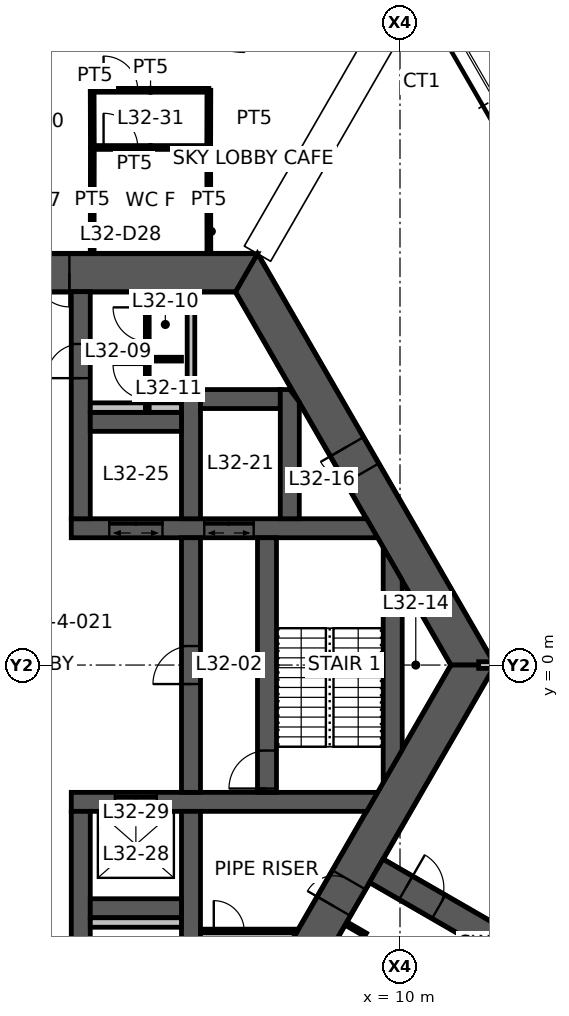
"""IFC4 building model, lengths in metres.
Left out: names, types, materials, properties, quantities, classifications, styles, units other than length and angle.
Written with IfcOpenShell. Run it as: python <this file> out.ifc"""

import sys

from ifc_helpers import new_model, si_unit, direction, frame, frame_2d, origin, place, context, subcontext, project, spatial, polyline, rectangle, outline, extrude, element, fill, save


model = new_model("IFC4")
c1 = context("Model", 3, precision=1e-05, world=origin(), true_north=direction((0.0, 1.0)))
c2 = subcontext(c1, "Body", "Model", "MODEL_VIEW")
j1 = project(units=[si_unit("LENGTHUNIT", "METRE"), si_unit("PLANEANGLEUNIT", "RADIAN")], contexts=[c1])
p1 = place(None, origin())
s1 = spatial("IfcSite", under=j1, at=p1, CompositionType="ELEMENT")
p2 = place(p1, origin())
s2 = spatial("IfcBuilding", under=s1, at=p2, CompositionType="ELEMENT")
p3 = place(p2, frame((0.0, 0.0, 128.6)))
s3 = spatial("IfcBuildingStorey", under=s2, at=p3, CompositionType="ELEMENT", Elevation=128.6)
p4 = place(p3, frame((11.922, 0.0, 0.0), z_axis=(0.0, 0.0, 1.0), x_axis=(-0.500004296715, 0.866022923061, 0.0)))
e1 = element("IfcWall", 1, at=p4, inside=s3, PredefinedType="SHEAR", context=c2, shape_type="SweptSolid", body=[
    extrude(outline(polyline([(-0.289, -0.5), (5.835, -0.5), (6.635, -0.5), (12.211, -0.5), (11.634, 0.5), (6.635, 0.5), (5.835, 0.5), (0.289, 0.5), (-0.289, -0.5)])), origin(), (0.0, 0.0, 1.0), 4.5),
])
p5 = place(p4, frame((5.835, 0.0, 0.0)))
e2 = element("IfcOpeningElement", 2, at=p5, cuts=e1, PredefinedType="OPENING", context=c2, shape_type="SweptSolid", body=[
    extrude(rectangle(XDim=0.8, YDim=2.1, at=frame_2d((0.4, 1.05))), frame((0.0, 0.51, 0.0), z_axis=(0.0, -1.0, 0.0), x_axis=(1.0, 0.0, 0.0)), (0.0, 0.0, 1.0), 1.02),
])
p6 = place(p3, frame((5.961, 10.325, 0.0), z_axis=(0.0, 0.0, 1.0), x_axis=(-1.0, 0.0, 0.0)))
e3 = element("IfcWall", 3, at=p6, inside=s3, PredefinedType="SHEAR", context=c2, shape_type="SweptSolid", body=[
    extrude(outline(polyline([(-0.289, -0.5), (4.661, -0.5), (5.561, -0.5), (6.361, -0.5), (7.261, -0.5), (12.211, -0.5), (11.634, 0.5), (7.261, 0.5), (6.361, 0.5), (5.561, 0.5), (4.661, 0.5), (0.289, 0.5), (-0.289, -0.5)])), origin(), (0.0, 0.0, 1.0), 4.5),
])
p7 = place(p6, frame((6.361, 0.0, 0.0)))
e4 = element("IfcOpeningElement", 4, at=p7, cuts=e3, PredefinedType="OPENING", context=c2, shape_type="SweptSolid", body=[
    extrude(rectangle(XDim=0.9, YDim=2.1, at=frame_2d((0.45, 1.05))), frame((0.0, 0.51, 0.0), z_axis=(0.0, -1.0, 0.0), x_axis=(1.0, 0.0, 0.0)), (0.0, 0.0, 1.0), 1.02),
])
p8 = place(p6, frame((4.661, 0.0, 0.0)))
e5 = element("IfcOpeningElement", 5, at=p8, cuts=e3, PredefinedType="OPENING", context=c2, shape_type="SweptSolid", body=[
    extrude(rectangle(XDim=0.9, YDim=2.1, at=frame_2d((0.45, 1.05))), frame((0.0, 0.51, 0.0), z_axis=(0.0, -1.0, 0.0), x_axis=(1.0, 0.0, 0.0)), (0.0, 0.0, 1.0), 1.02),
])
p9 = place(p3, frame((5.961, -10.325, 0.0), z_axis=(0.0, 0.0, 1.0), x_axis=(0.500004296715, 0.866022923061, 0.0)))
e6 = element("IfcWall", 6, at=p9, inside=s3, PredefinedType="SHEAR", context=c2, shape_type="SweptSolid", body=[
    extrude(outline(polyline([(-0.289, -0.5), (4.594, -0.5), (5.394, -0.5), (12.211, -0.5), (11.634, 0.5), (5.394, 0.5), (4.594, 0.5), (0.289, 0.5), (-0.289, -0.5)])), origin(), (0.0, 0.0, 1.0), 4.5),
])
p10 = place(p9, frame((4.594, 0.0, 0.0)))
e7 = element("IfcOpeningElement", 7, at=p10, cuts=e6, PredefinedType="OPENING", context=c2, shape_type="SweptSolid", body=[
    extrude(rectangle(XDim=0.8, YDim=2.1, at=frame_2d((0.4, 1.05))), frame((0.0, 0.51, 0.0), z_axis=(0.0, -1.0, 0.0), x_axis=(1.0, 0.0, 0.0)), (0.0, 0.0, 1.0), 1.02),
])
p11 = place(p3, frame((9.375, -5.413, 0.0), z_axis=(0.0, 0.0, 1.0), x_axis=(0.866032377459, -0.499987921047, 0.0)))
e8 = element("IfcWall", 8, at=p11, inside=s3, PredefinedType="SHEAR", context=c2, shape_type="SweptSolid", body=[
    extrude(rectangle(XDim=7.696, YDim=0.7, at=frame_2d((3.848, 0.0))), origin(), (0.0, 0.0, 1.0), 4.5),
])
p12 = place(p11, frame((0.9, 0.0, 0.0)))
e9 = element("IfcOpeningElement", 9, at=p12, cuts=e8, PredefinedType="OPENING", context=c2, shape_type="SweptSolid", body=[
    extrude(rectangle(XDim=1.0, YDim=2.1, at=frame_2d((0.5, 1.05))), frame((0.0, 0.36, 0.0), z_axis=(0.0, -1.0, 0.0), x_axis=(1.0, 0.0, 0.0)), (0.0, 0.0, 1.0), 0.72),
])
p13 = place(p3, frame((1.35, 3.6, 0.0), z_axis=(0.0, 0.0, 1.0), x_axis=(1.0, 0.0, 0.0)))
e10 = element("IfcWall", 10, at=p13, inside=s3, PredefinedType="SHEAR", context=c2, shape_type="SweptSolid", body=[
    extrude(outline(polyline([(0.0, -0.25), (1.0, -0.25), (2.4, -0.25), (3.5, -0.25), (4.8, -0.25), (8.061, -0.25), (7.772, 0.25), (4.8, 0.25), (3.5, 0.25), (2.4, 0.25), (1.0, 0.25), (0.0, 0.25), (0.0, -0.25)])), origin(), (0.0, 0.0, 1.0), 4.5),
])
p14 = place(p13, frame((1.0, 0.0, 0.0)))
e11 = element("IfcOpeningElement", 11, at=p14, cuts=e10, PredefinedType="OPENING", context=c2, shape_type="SweptSolid", body=[
    extrude(rectangle(XDim=1.4, YDim=2.1, at=frame_2d((0.7, 1.05))), frame((0.0, 0.26, 0.0), z_axis=(0.0, -1.0, 0.0), x_axis=(1.0, 0.0, 0.0)), (0.0, 0.0, 1.0), 0.52),
])
p15 = place(p13, frame((3.5, 0.0, 0.0)))
e12 = element("IfcOpeningElement", 12, at=p15, cuts=e10, PredefinedType="OPENING", context=c2, shape_type="SweptSolid", body=[
    extrude(rectangle(XDim=1.3, YDim=2.1, at=frame_2d((0.65, 1.05))), frame((0.0, 0.26, 0.0), z_axis=(0.0, -1.0, 0.0), x_axis=(1.0, 0.0, 0.0)), (0.0, 0.0, 1.0), 0.52),
])
p16 = place(p3, frame((1.35, -3.6, 0.0), z_axis=(0.0, 0.0, 1.0), x_axis=(1.0, 0.0, 0.0)))
e13 = element("IfcWall", 13, at=p16, inside=s3, PredefinedType="SHEAR", context=c2, shape_type="SweptSolid", body=[
    extrude(outline(polyline([(0.0, -0.25), (1.15, -0.25), (2.25, -0.25), (7.772, -0.25), (8.061, 0.25), (2.25, 0.25), (1.15, 0.25), (0.0, 0.25), (0.0, -0.25)])), origin(), (0.0, 0.0, 1.0), 4.5),
])
p17 = place(p16, frame((1.15, 0.0, 0.0)))
e14 = element("IfcOpeningElement", 14, at=p17, cuts=e13, PredefinedType="OPENING", context=c2, shape_type="SweptSolid", body=[
    extrude(rectangle(XDim=1.1, YDim=2.1, at=frame_2d((0.55, 1.05))), frame((0.0, 0.26, 0.0), z_axis=(0.0, -1.0, 0.0), x_axis=(1.0, 0.0, 0.0)), (0.0, 0.0, 1.0), 0.52),
])
p18 = place(p3, frame((1.6, 3.85, 0.0), z_axis=(0.0, 0.0, 1.0), x_axis=(0.0, 1.0, 0.0)))
e15 = element("IfcWall", 15, at=p18, inside=s3, PredefinedType="SHEAR", context=c2, shape_type="SweptSolid", body=[
    extrude(rectangle(XDim=5.975, YDim=0.5, at=frame_2d((2.987, 0.0))), origin(), (0.0, 0.0, 1.0), 4.5),
])
p19 = place(p18, frame((3.7, 0.0, 0.0)))
e16 = element("IfcOpeningElement", 16, at=p19, cuts=e15, PredefinedType="OPENING", context=c2, shape_type="SweptSolid", body=[
    extrude(rectangle(XDim=0.9, YDim=2.1, at=frame_2d((0.45, 1.05))), frame((0.0, 0.26, 0.0), z_axis=(0.0, -1.0, 0.0), x_axis=(1.0, 0.0, 0.0)), (0.0, 0.0, 1.0), 0.52),
])
p20 = place(p3, frame((1.6, -3.85, 0.0), z_axis=(0.0, 0.0, 1.0), x_axis=(0.0, -1.0, 0.0)))
e17 = element("IfcWall", 17, at=p20, inside=s3, PredefinedType="SHEAR", context=c2, shape_type="SweptSolid", body=[
    extrude(rectangle(XDim=5.975, YDim=0.5, at=frame_2d((2.987, 0.0))), origin(), (0.0, 0.0, 1.0), 4.5),
])
p21 = place(p20, frame((3.55, 0.0, 0.0)))
e18 = element("IfcOpeningElement", 18, at=p21, cuts=e17, PredefinedType="OPENING", context=c2, shape_type="SweptSolid", body=[
    extrude(rectangle(XDim=1.2, YDim=2.1, at=frame_2d((0.6, 1.05))), frame((0.0, 0.26, 0.0), z_axis=(0.0, -1.0, 0.0), x_axis=(1.0, 0.0, 0.0)), (0.0, 0.0, 1.0), 0.52),
])
p22 = place(p3, frame((4.5, -3.35, 0.0), z_axis=(0.0, 0.0, 1.0), x_axis=(0.0, 1.0, 0.0)))
e19 = element("IfcWall", 19, at=p22, inside=s3, PredefinedType="SHEAR", context=c2, shape_type="SweptSolid", body=[
    extrude(rectangle(XDim=6.7, YDim=0.5, at=frame_2d((3.35, 0.0))), origin(), (0.0, 0.0, 1.0), 4.5),
])
p23 = place(p22, frame((2.85, 0.0, 0.0)))
e20 = element("IfcOpeningElement", 20, at=p23, cuts=e19, PredefinedType="OPENING", context=c2, shape_type="SweptSolid", body=[
    extrude(rectangle(XDim=1.0, YDim=2.1, at=frame_2d((0.5, 1.05))), frame((0.0, 0.26, 0.0), z_axis=(0.0, -1.0, 0.0), x_axis=(1.0, 0.0, 0.0)), (0.0, 0.0, 1.0), 0.52),
])
p24 = place(p3, frame((6.5, -3.35, 0.0), z_axis=(0.0, 0.0, 1.0), x_axis=(0.0, 1.0, 0.0)))
e21 = element("IfcWall", 21, at=p24, inside=s3, PredefinedType="SHEAR", context=c2, shape_type="SweptSolid", body=[
    extrude(rectangle(XDim=6.7, YDim=0.5, at=frame_2d((3.35, 0.0))), origin(), (0.0, 0.0, 1.0), 4.5),
])
p25 = place(p24, frame((0.1, 0.0, 0.0)))
e22 = element("IfcOpeningElement", 22, at=p25, cuts=e21, PredefinedType="OPENING", context=c2, shape_type="SweptSolid", body=[
    extrude(rectangle(XDim=1.0, YDim=2.1, at=frame_2d((0.5, 1.05))), frame((0.0, 0.26, 0.0), z_axis=(0.0, -1.0, 0.0), x_axis=(1.0, 0.0, 0.0)), (0.0, 0.0, 1.0), 0.52),
])
p26 = place(p3, frame((4.5, 3.85, 0.0), z_axis=(0.0, 0.0, 1.0), x_axis=(0.0, 1.0, 0.0)))
e23 = element("IfcWall", 23, at=p26, inside=s3, PredefinedType="SHEAR", context=c2, shape_type="SweptSolid", body=[
    extrude(rectangle(XDim=3.4, YDim=0.5, at=frame_2d((1.7, 0.0))), origin(), (0.0, 0.0, 1.0), 4.5),
])
p27 = place(p3, frame((4.5, -3.85, 0.0), z_axis=(0.0, 0.0, 1.0), x_axis=(0.0, -1.0, 0.0)))
e24 = element("IfcWall", 24, at=p27, inside=s3, PredefinedType="SHEAR", context=c2, shape_type="SweptSolid", body=[
    extrude(rectangle(XDim=5.975, YDim=0.5, at=frame_2d((2.987, 0.0))), origin(), (0.0, 0.0, 1.0), 4.5),
])
for number, where, z_axis, x_axis in (
    (25, (1.85, 6.4, 0.0), (0.0, 0.0, 1.0), (1.0, 0.0, 0.0)),
    (26, (1.85, -6.4, 0.0), (0.0, 0.0, 1.0), (1.0, 0.0, 0.0)),
):
    element("IfcWall", number, at=place(p3, frame(where, z_axis=z_axis, x_axis=x_axis)), inside=s3, PredefinedType="SHEAR", context=c2, shape_type="SweptSolid", body=[
        extrude(rectangle(XDim=2.4, YDim=0.5, at=frame_2d((1.2, 0.0))), origin(), (0.0, 0.0, 1.0), 4.5),
    ])
p28 = place(p3, frame((4.75, 7.0, 0.0), z_axis=(0.0, 0.0, 1.0), x_axis=(1.0, 0.0, 0.0)))
e27 = element("IfcWall", 27, at=p28, inside=s3, PredefinedType="SHEAR", context=c2, shape_type="SweptSolid", body=[
    extrude(rectangle(XDim=2.1, YDim=0.5, at=frame_2d((1.05, 0.0))), origin(), (0.0, 0.0, 1.0), 4.5),
])
p29 = place(p3, frame((7.1, 3.85, 0.0), z_axis=(0.0, 0.0, 1.0), x_axis=(0.0, 1.0, 0.0)))
e28 = element("IfcWall", 28, at=p29, inside=s3, PredefinedType="SHEAR", context=c2, shape_type="SweptSolid", body=[
    extrude(outline(polyline([(0.0, -0.25), (3.069, -0.25), (3.4, 0.0), (3.4, 0.25), (0.0, 0.25), (0.0, -0.25)])), origin(), (0.0, 0.0, 1.0), 4.5),
])
p30 = place(p3, frame((9.808, -2.662, 0.0), z_axis=(0.0, 0.0, 1.0), x_axis=(0.0, 1.0, 0.0)))
e29 = element("IfcWall", 29, at=p30, inside=s3, PredefinedType="SHEAR", context=c2, shape_type="SweptSolid", body=[
    extrude(outline(polyline([(0.433, -0.25), (4.892, -0.25), (5.758, 0.25), (-0.433, 0.25), (0.433, -0.25)])), origin(), (0.0, 0.0, 1.0), 4.5),
])
p31 = place(p3, frame((4.5, 7.25, 0.0), z_axis=(0.0, 0.0, 1.0), x_axis=(0.0, 1.0, 0.0)))
e30 = element("IfcWall", 30, at=p31, inside=s3, PredefinedType="STANDARD", context=c2, shape_type="SweptSolid", body=[
    extrude(rectangle(XDim=2.575, YDim=0.2, at=frame_2d((1.288, 0.0))), origin(), (0.0, 0.0, 1.0), 4.5),
])
for number, where, z_axis, x_axis in (
    (31, (1.85, 6.775, 0.0), (0.0, 0.0, 1.0), (1.0, 0.0, 0.0)),
    (32, (1.85, -6.775, 0.0), (0.0, 0.0, 1.0), (1.0, 0.0, 0.0)),
):
    element("IfcWall", number, at=place(p3, frame(where, z_axis=z_axis, x_axis=x_axis)), inside=s3, PredefinedType="PLUMBINGWALL", context=c2, shape_type="SweptSolid", body=[
        extrude(rectangle(XDim=2.4, YDim=0.25, at=frame_2d((1.2, 0.0))), origin(), (0.0, 0.0, 1.0), 4.5),
    ])
p32 = place(p3, frame((3.35, 6.65, 0.0), z_axis=(0.0, 0.0, 1.0), x_axis=(0.0, 1.0, 0.0)))
e33 = element("IfcWall", 33, at=p32, inside=s3, PredefinedType="PARTITIONING", context=c2, shape_type="SweptSolid", body=[
    extrude(rectangle(XDim=3.175, YDim=0.1, at=frame_2d((1.587, 0.0))), origin(), (0.0, 0.0, 1.0), 3.55),
])
p33 = place(p32, frame((1.863, 0.0, 0.0)))
e34 = element("IfcOpeningElement", 34, at=p33, cuts=e33, PredefinedType="OPENING", context=c2, shape_type="SweptSolid", body=[
    extrude(rectangle(XDim=0.9, YDim=2.1, at=frame_2d((0.45, 1.05))), frame((0.0, 0.06, 0.0), z_axis=(0.0, -1.0, 0.0), x_axis=(1.0, 0.0, 0.0)), (0.0, 0.0, 1.0), 0.12),
])
p34 = place(p32, frame((0.35, 0.0, 0.0)))
e35 = element("IfcOpeningElement", 35, at=p34, cuts=e33, PredefinedType="OPENING", context=c2, shape_type="SweptSolid", body=[
    extrude(rectangle(XDim=0.9, YDim=2.1, at=frame_2d((0.45, 1.05))), frame((0.0, 0.06, 0.0), z_axis=(0.0, -1.0, 0.0), x_axis=(1.0, 0.0, 0.0)), (0.0, 0.0, 1.0), 0.12),
])
p35 = place(p3, frame((3.4, 8.05, 0.0), z_axis=(0.0, 0.0, 1.0), x_axis=(1.0, 0.0, 0.0)))
e36 = element("IfcWall", 36, at=p35, inside=s3, PredefinedType="PARTITIONING", context=c2, shape_type="SweptSolid", body=[
    extrude(rectangle(XDim=0.85, YDim=0.1, at=frame_2d((0.425, 0.0))), origin(), (0.0, 0.0, 1.0), 3.55),
])
p36 = place(p3, frame((4.75, -7.0, 0.0), z_axis=(0.0, 0.0, 1.0), x_axis=(1.0, 0.0, 0.0)))
e37 = element("IfcWall", 37, at=p36, inside=s3, PredefinedType="PARTITIONING", context=c2, shape_type="SweptSolid", body=[
    extrude(outline(polyline([(0.0, -0.05), (0.35, -0.05), (1.15, -0.05), (2.525, -0.05), (2.553, 0.0), (2.559, 0.05), (1.15, 0.05), (0.35, 0.05), (0.0, 0.05), (0.0, -0.05)])), origin(), (0.0, 0.0, 1.0), 3.55),
])
p37 = place(p36, frame((0.35, 0.0, 0.0)))
e38 = element("IfcOpeningElement", 38, at=p37, cuts=e37, PredefinedType="OPENING", context=c2, shape_type="SweptSolid", body=[
    extrude(rectangle(XDim=0.8, YDim=2.1, at=frame_2d((0.4, 1.05))), frame((0.0, 0.06, 0.0), z_axis=(0.0, -1.0, 0.0), x_axis=(1.0, 0.0, 0.0)), (0.0, 0.0, 1.0), 0.12),
])
p38 = place(p3, frame((12.07, 0.0, 0.0), z_axis=(0.0, 0.0, 1.0), x_axis=(1.0, 0.0, 0.0)))
e39 = element("IfcWall", 39, at=p38, inside=s3, PredefinedType="PARTITIONING", context=c2, shape_type="SweptSolid", body=[
    extrude(rectangle(XDim=7.93, YDim=0.175, at=frame_2d((3.965, 0.0))), origin(), (0.0, 0.0, 1.0), 3.65),
])
p39 = place(p38, frame((1.13, 0.0, 0.0)))
e40 = element("IfcOpeningElement", 40, at=p39, cuts=e39, PredefinedType="OPENING", context=c2, shape_type="SweptSolid", body=[
    extrude(rectangle(XDim=1.0, YDim=2.1, at=frame_2d((0.5, 1.05))), frame((0.0, 0.098, 0.0), z_axis=(0.0, -1.0, 0.0), x_axis=(1.0, 0.0, 0.0)), (0.0, 0.0, 1.0), 0.195),
])
p40 = place(p3, frame((1.9, 13.62, 0.0), z_axis=(0.0, 0.0, 1.0), x_axis=(1.0, 0.0, 0.0)))
e41 = element("IfcWall", 41, at=p40, inside=s3, PredefinedType="PARTITIONING", context=c2, shape_type="SweptSolid", body=[
    extrude(rectangle(XDim=3.071, YDim=0.1, at=frame_2d((1.536, 0.0))), origin(), (0.0, 0.0, 1.0), 3.55),
])
p41 = place(p40, frame((0.3, 0.0, 0.0)))
e42 = element("IfcOpeningElement", 42, at=p41, cuts=e41, PredefinedType="OPENING", context=c2, shape_type="SweptSolid", body=[
    extrude(rectangle(XDim=0.9, YDim=2.1, at=frame_2d((0.45, 1.05))), frame((0.0, 0.06, 0.0), z_axis=(0.0, -1.0, 0.0), x_axis=(1.0, 0.0, 0.0)), (0.0, 0.0, 1.0), 0.12),
])
for number, where, z_axis, x_axis in (
    (43, (1.9, 10.845, 0.0), (0.0, 0.0, 1.0), (0.002, 1.0, 0.0)),
    (44, (4.966, 13.625, 0.0), (0.0, 0.0, 1.0), (0.002, -1.0, 0.0)),
):
    element("IfcWall", number, at=place(p3, frame(where, z_axis=z_axis, x_axis=x_axis)), inside=s3, PredefinedType="PARTITIONING", context=c2, shape_type="SweptSolid", body=[
        extrude(rectangle(XDim=2.78, YDim=0.1, at=frame_2d((1.39, 0.0))), origin(), (0.0, 0.0, 1.0), 3.55),
    ])
p42 = place(p3, frame((1.9, 15.125, 0.0), z_axis=(0.0, 0.0, 1.0), x_axis=(1.0, 0.0, 0.0)))
e45 = element("IfcWall", 45, at=p42, inside=s3, PredefinedType="PARTITIONING", context=c2, shape_type="SweptSolid", body=[
    extrude(rectangle(XDim=3.071, YDim=0.1, at=frame_2d((1.536, 0.0))), origin(), (0.0, 0.0, 1.0), 3.55),
])
p43 = place(p42, frame((0.3, 0.0, 0.0)))
e46 = element("IfcOpeningElement", 46, at=p43, cuts=e45, PredefinedType="OPENING", context=c2, shape_type="SweptSolid", body=[
    extrude(rectangle(XDim=0.9, YDim=2.1, at=frame_2d((0.45, 1.05))), frame((0.0, 0.06, 0.0), z_axis=(0.0, -1.0, 0.0), x_axis=(1.0, 0.0, 0.0)), (0.0, 0.0, 1.0), 0.12),
])
for number, where, z_axis, x_axis in (
    (47, (1.905, 13.625, 0.0), (0.0, 0.0, 1.0), (-0.003, 1.0, 0.0)),
    (48, (4.971, 15.125, 0.0), (0.0, 0.0, 1.0), (-0.003, -1.0, 0.0)),
):
    element("IfcWall", number, at=place(p3, frame(where, z_axis=z_axis, x_axis=x_axis)), inside=s3, PredefinedType="PARTITIONING", context=c2, shape_type="SweptSolid", body=[
        extrude(rectangle(XDim=1.5, YDim=0.1, at=frame_2d((0.75, 0.0))), origin(), (0.0, 0.0, 1.0), 3.55),
    ])
p44 = place(p3, frame((8.592, -6.808, 0.0), z_axis=(0.0, 0.0, 1.0), x_axis=(0.865954211699, -0.50012328804, 0.0)))
e49 = element("IfcWall", 49, at=p44, inside=s3, PredefinedType="PARTITIONING", context=c2, shape_type="SweptSolid", body=[
    extrude(rectangle(XDim=0.58, YDim=0.1, at=frame_2d((0.29, 0.0))), origin(), (0.0, 0.0, 1.0), 3.55),
])
p45 = place(p8, origin())
e50 = element("IfcDoor", 50, at=p45, inside=s3, OperationType="SINGLE_SWING_LEFT", PredefinedType="DOOR", context=c2, shape_type="SweptSolid", body=[
    extrude(rectangle(XDim=0.9, YDim=2.1, at=frame_2d((0.45, 1.05))), frame((0.0, 0.025, 0.0), z_axis=(0.0, -1.0, 0.0), x_axis=(1.0, 0.0, 0.0)), (0.0, 0.0, 1.0), 0.05),
])
fill(e5, e50)
p46 = place(p5, origin())
e51 = element("IfcDoor", 51, at=p46, inside=s3, OperationType="SINGLE_SWING_RIGHT", PredefinedType="DOOR", context=c2, shape_type="SweptSolid", body=[
    extrude(rectangle(XDim=0.8, YDim=2.1, at=frame_2d((0.4, 1.05))), frame((0.0, 0.025, 0.0), z_axis=(0.0, -1.0, 0.0), x_axis=(1.0, 0.0, 0.0)), (0.0, 0.0, 1.0), 0.05),
])
fill(e2, e51)
p47 = place(p10, origin())
e52 = element("IfcDoor", 52, at=p47, inside=s3, OperationType="SINGLE_SWING_LEFT", PredefinedType="DOOR", context=c2, shape_type="SweptSolid", body=[
    extrude(rectangle(XDim=0.8, YDim=2.1, at=frame_2d((0.4, 1.05))), frame((0.0, 0.025, 0.0), z_axis=(0.0, -1.0, 0.0), x_axis=(1.0, 0.0, 0.0)), (0.0, 0.0, 1.0), 0.05),
])
fill(e7, e52)
p48 = place(p23, origin())
e53 = element("IfcDoor", 53, at=p48, inside=s3, OperationType="SINGLE_SWING_LEFT", PredefinedType="DOOR", context=c2, shape_type="SweptSolid", body=[
    extrude(rectangle(XDim=1.0, YDim=2.1, at=frame_2d((0.5, 1.05))), frame((0.0, 0.025, 0.0), z_axis=(0.0, -1.0, 0.0), x_axis=(1.0, 0.0, 0.0)), (0.0, 0.0, 1.0), 0.05),
])
fill(e20, e53)
p49 = place(p25, origin())
e54 = element("IfcDoor", 54, at=p49, inside=s3, OperationType="SINGLE_SWING_LEFT", PredefinedType="DOOR", context=c2, shape_type="SweptSolid", body=[
    extrude(rectangle(XDim=1.0, YDim=2.1, at=frame_2d((0.5, 1.05))), frame((0.0, 0.025, 0.0), z_axis=(0.0, -1.0, 0.0), x_axis=(1.0, 0.0, 0.0)), (0.0, 0.0, 1.0), 0.05),
])
fill(e22, e54)
p50 = place(p19, origin())
e55 = element("IfcDoor", 55, at=p50, inside=s3, OperationType="SINGLE_SWING_LEFT", PredefinedType="DOOR", context=c2, shape_type="SweptSolid", body=[
    extrude(rectangle(XDim=0.9, YDim=2.1, at=frame_2d((0.45, 1.05))), frame((0.0, 0.025, 0.0), z_axis=(0.0, -1.0, 0.0), x_axis=(1.0, 0.0, 0.0)), (0.0, 0.0, 1.0), 0.05),
])
fill(e16, e55)
p51 = place(p12, origin())
e56 = element("IfcDoor", 56, at=p51, inside=s3, OperationType="SINGLE_SWING_LEFT", PredefinedType="DOOR", context=c2, shape_type="SweptSolid", body=[
    extrude(rectangle(XDim=1.0, YDim=2.1, at=frame_2d((0.5, 1.05))), frame((0.0, 0.025, 0.0), z_axis=(0.0, -1.0, 0.0), x_axis=(1.0, 0.0, 0.0)), (0.0, 0.0, 1.0), 0.05),
])
fill(e9, e56)
p52 = place(p33, origin())
e57 = element("IfcDoor", 57, at=p52, inside=s3, OperationType="SINGLE_SWING_RIGHT", PredefinedType="DOOR", context=c2, shape_type="SweptSolid", body=[
    extrude(rectangle(XDim=0.9, YDim=2.1, at=frame_2d((0.45, 1.05))), frame((0.0, 0.025, 0.0), z_axis=(0.0, -1.0, 0.0), x_axis=(1.0, 0.0, 0.0)), (0.0, 0.0, 1.0), 0.05),
])
fill(e34, e57)
p53 = place(p34, origin())
e58 = element("IfcDoor", 58, at=p53, inside=s3, OperationType="SINGLE_SWING_RIGHT", PredefinedType="DOOR", context=c2, shape_type="SweptSolid", body=[
    extrude(rectangle(XDim=0.9, YDim=2.1, at=frame_2d((0.45, 1.05))), frame((0.0, 0.025, 0.0), z_axis=(0.0, -1.0, 0.0), x_axis=(1.0, 0.0, 0.0)), (0.0, 0.0, 1.0), 0.05),
])
fill(e35, e58)
p54 = place(p37, origin())
e59 = element("IfcDoor", 59, at=p54, inside=s3, OperationType="SINGLE_SWING_LEFT", PredefinedType="DOOR", context=c2, shape_type="SweptSolid", body=[
    extrude(rectangle(XDim=0.8, YDim=2.1, at=frame_2d((0.4, 1.05))), frame((0.0, 0.025, 0.0), z_axis=(0.0, -1.0, 0.0), x_axis=(1.0, 0.0, 0.0)), (0.0, 0.0, 1.0), 0.05),
])
fill(e38, e59)
p55 = place(p41, origin())
e60 = element("IfcDoor", 60, at=p55, inside=s3, OperationType="SINGLE_SWING_LEFT", PredefinedType="DOOR", context=c2, shape_type="SweptSolid", body=[
    extrude(rectangle(XDim=0.9, YDim=2.1, at=frame_2d((0.45, 1.05))), frame((0.0, 0.025, 0.0), z_axis=(0.0, -1.0, 0.0), x_axis=(1.0, 0.0, 0.0)), (0.0, 0.0, 1.0), 0.05),
])
fill(e42, e60)
p56 = place(p43, origin())
e61 = element("IfcDoor", 61, at=p56, inside=s3, OperationType="SINGLE_SWING_LEFT", PredefinedType="DOOR", context=c2, shape_type="SweptSolid", body=[
    extrude(rectangle(XDim=0.9, YDim=2.1, at=frame_2d((0.45, 1.05))), frame((0.0, 0.025, 0.0), z_axis=(0.0, -1.0, 0.0), x_axis=(1.0, 0.0, 0.0)), (0.0, 0.0, 1.0), 0.05),
])
fill(e46, e61)
p57 = place(p17, origin())
e62 = element("IfcDoor", 62, at=p57, inside=s3, OperationType="DOUBLE_DOOR_SLIDING", PredefinedType="DOOR", context=c2, shape_type="SweptSolid", body=[
    extrude(rectangle(XDim=1.1, YDim=2.1, at=frame_2d((0.55, 1.05))), frame((0.0, 0.025, 0.0), z_axis=(0.0, -1.0, 0.0), x_axis=(1.0, 0.0, 0.0)), (0.0, 0.0, 1.0), 0.05),
])
fill(e14, e62)
p58 = place(p14, origin())
e63 = element("IfcDoor", 63, at=p58, inside=s3, OperationType="DOUBLE_DOOR_SLIDING", PredefinedType="DOOR", context=c2, shape_type="SweptSolid", body=[
    extrude(rectangle(XDim=1.4, YDim=2.1, at=frame_2d((0.7, 1.05))), frame((0.0, 0.025, 0.0), z_axis=(0.0, -1.0, 0.0), x_axis=(1.0, 0.0, 0.0)), (0.0, 0.0, 1.0), 0.05),
])
fill(e11, e63)
p59 = place(p15, origin())
e64 = element("IfcDoor", 64, at=p59, inside=s3, OperationType="DOUBLE_DOOR_SLIDING", PredefinedType="DOOR", context=c2, shape_type="SweptSolid", body=[
    extrude(rectangle(XDim=1.3, YDim=2.1, at=frame_2d((0.65, 1.05))), frame((0.0, 0.025, 0.0), z_axis=(0.0, -1.0, 0.0), x_axis=(1.0, 0.0, 0.0)), (0.0, 0.0, 1.0), 0.05),
])
fill(e12, e64)
save(model, sys.argv[1])
